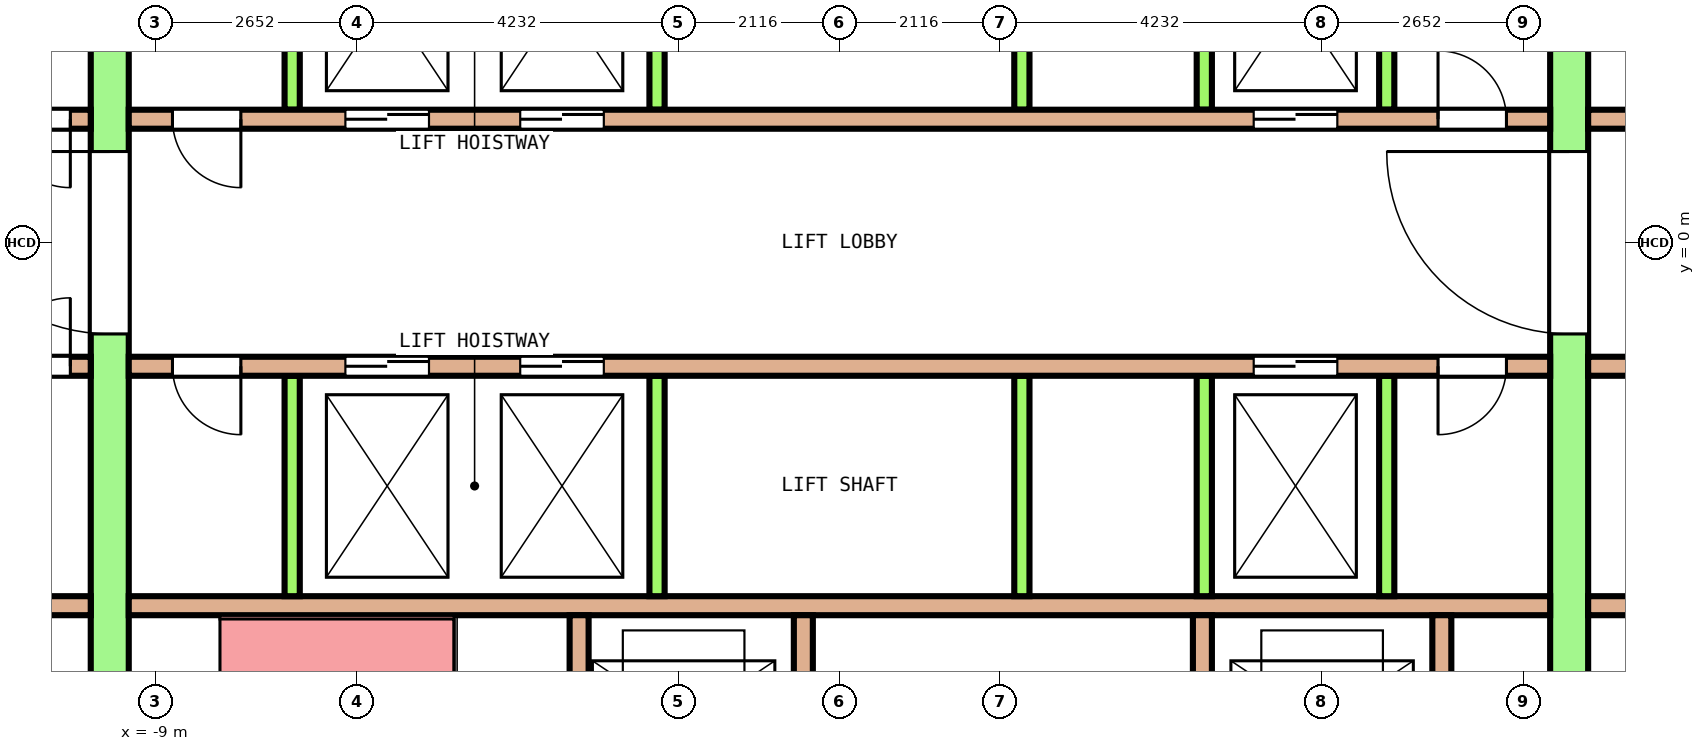
"""IFC4 building model, lengths in metres.
Left out: names, types, materials, properties, quantities, classifications, styles, units other than length and angle.
Written with IfcOpenShell. Run it as: python <this file> out.ifc"""

import sys

from ifc_helpers import new_model, si_unit, direction, frame, frame_2d, origin, place, context, subcontext, project, spatial, rectangle, extrude, element, fill, save


model = new_model("IFC4")
c1 = context("Model", 3, precision=1e-05, world=origin(), true_north=direction((0.0, 1.0)))
c2 = subcontext(c1, "Body", "Model", "MODEL_VIEW")
j1 = project(units=[si_unit("LENGTHUNIT", "METRE"), si_unit("PLANEANGLEUNIT", "RADIAN")], contexts=[c1])
p1 = place(None, origin())
s1 = spatial("IfcSite", under=j1, at=p1, CompositionType="ELEMENT")
p2 = place(p1, origin())
s2 = spatial("IfcBuilding", under=s1, at=p2, CompositionType="ELEMENT")
p3 = place(p2, frame((0.0, 0.0, 149.6)))
s3 = spatial("IfcBuildingStorey", under=s2, at=p3, CompositionType="ELEMENT", Elevation=149.6)
p4 = place(p3, frame((-9.6, -7.75, 0.0), z_axis=(0.0, 0.0, 1.0), x_axis=(0.0, 1.0, 0.0)))
e1 = element("IfcWall", 1, at=p4, inside=s3, PredefinedType="SHEAR", context=c2, shape_type="SweptSolid", body=[
    extrude(rectangle(XDim=15.5, YDim=0.5, at=frame_2d((7.75, 0.0))), origin(), (0.0, 0.0, 1.0), 4.1),
])
p5 = place(p4, frame((6.55, 0.0, 0.0)))
e2 = element("IfcOpeningElement", 2, at=p5, cuts=e1, PredefinedType="OPENING", context=c2, shape_type="SweptSolid", body=[
    extrude(rectangle(XDim=2.4, YDim=2.1, at=frame_2d((1.2, 1.05))), frame((0.0, 0.26, 0.0), z_axis=(0.0, -1.0, 0.0), x_axis=(1.0, 0.0, 0.0)), (0.0, 0.0, 1.0), 0.52),
])
p6 = place(p4, frame((13.45, 0.0, 0.0)))
e3 = element("IfcOpeningElement", 3, at=p6, cuts=e1, PredefinedType="OPENING", context=c2, shape_type="SweptSolid", body=[
    extrude(rectangle(XDim=1.2, YDim=2.1, at=frame_2d((0.6, 1.05))), frame((0.0, 0.26, 0.0), z_axis=(0.0, -1.0, 0.0), x_axis=(1.0, 0.0, 0.0)), (0.0, 0.0, 1.0), 0.52),
])
p7 = place(p4, frame((0.85, 0.0, 0.0)))
e4 = element("IfcOpeningElement", 4, at=p7, cuts=e1, PredefinedType="OPENING", context=c2, shape_type="SweptSolid", body=[
    extrude(rectangle(XDim=1.2, YDim=2.1, at=frame_2d((0.6, 1.05))), frame((0.0, 0.26, 0.0), z_axis=(0.0, -1.0, 0.0), x_axis=(1.0, 0.0, 0.0)), (0.0, 0.0, 1.0), 0.52),
])
p8 = place(p3, frame((9.6, -7.75, 0.0), z_axis=(0.0, 0.0, 1.0), x_axis=(0.0, 1.0, 0.0)))
e5 = element("IfcWall", 5, at=p8, inside=s3, PredefinedType="SHEAR", context=c2, shape_type="SweptSolid", body=[
    extrude(rectangle(XDim=15.5, YDim=0.5, at=frame_2d((7.75, 0.0))), origin(), (0.0, 0.0, 1.0), 4.1),
])
p9 = place(p8, frame((6.55, 0.0, 0.0)))
e6 = element("IfcOpeningElement", 6, at=p9, cuts=e5, PredefinedType="OPENING", context=c2, shape_type="SweptSolid", body=[
    extrude(rectangle(XDim=2.4, YDim=2.1, at=frame_2d((1.2, 1.05))), frame((0.0, 0.26, 0.0), z_axis=(0.0, -1.0, 0.0), x_axis=(1.0, 0.0, 0.0)), (0.0, 0.0, 1.0), 0.52),
])
p10 = place(p8, frame((13.45, 0.0, 0.0)))
e7 = element("IfcOpeningElement", 7, at=p10, cuts=e5, PredefinedType="OPENING", context=c2, shape_type="SweptSolid", body=[
    extrude(rectangle(XDim=1.2, YDim=2.1, at=frame_2d((0.6, 1.05))), frame((0.0, 0.26, 0.0), z_axis=(0.0, -1.0, 0.0), x_axis=(1.0, 0.0, 0.0)), (0.0, 0.0, 1.0), 0.52),
])
p11 = place(p8, frame((0.95, 0.0, 0.0)))
e8 = element("IfcOpeningElement", 8, at=p11, cuts=e5, PredefinedType="OPENING", context=c2, shape_type="SweptSolid", body=[
    extrude(rectangle(XDim=1.0, YDim=2.1, at=frame_2d((0.5, 1.05))), frame((0.0, 0.26, 0.0), z_axis=(0.0, -1.0, 0.0), x_axis=(1.0, 0.0, 0.0)), (0.0, 0.0, 1.0), 0.52),
])
p12 = place(p3, frame((-12.85, 1.625, 0.0), z_axis=(0.0, 0.0, 1.0), x_axis=(1.0, 0.0, 0.0)))
e9 = element("IfcWall", 9, at=p12, inside=s3, PredefinedType="SOLIDWALL", context=c2, shape_type="SweptSolid", body=[
    extrude(rectangle(XDim=3.0, YDim=0.25, at=frame_2d((1.5, 0.0))), origin(), (0.0, 0.0, 1.0), 4.1),
])
p13 = place(p12, frame((0.269, 0.0, 0.0)))
e10 = element("IfcOpeningElement", 10, at=p13, cuts=e9, PredefinedType="OPENING", context=c2, shape_type="SweptSolid", body=[
    extrude(rectangle(XDim=0.9, YDim=2.1, at=frame_2d((0.45, 1.05))), frame((0.0, 0.135, 0.0), z_axis=(0.0, -1.0, 0.0), x_axis=(1.0, 0.0, 0.0)), (0.0, 0.0, 1.0), 0.27),
])
p14 = place(p12, frame((1.831, 0.0, 0.0)))
e11 = element("IfcOpeningElement", 11, at=p14, cuts=e9, PredefinedType="OPENING", context=c2, shape_type="SweptSolid", body=[
    extrude(rectangle(XDim=0.9, YDim=2.1, at=frame_2d((0.45, 1.05))), frame((0.0, 0.135, 0.0), z_axis=(0.0, -1.0, 0.0), x_axis=(1.0, 0.0, 0.0)), (0.0, 0.0, 1.0), 0.27),
])
p15 = place(p3, frame((-9.35, 1.625, 0.0), z_axis=(0.0, 0.0, 1.0), x_axis=(1.0, 0.0, 0.0)))
e12 = element("IfcWall", 12, at=p15, inside=s3, PredefinedType="SOLIDWALL", context=c2, shape_type="SweptSolid", body=[
    extrude(rectangle(XDim=18.7, YDim=0.25, at=frame_2d((9.35, 0.0))), origin(), (0.0, 0.0, 1.0), 4.1),
])
p16 = place(p15, frame((2.85, 0.0, 0.0)))
e13 = element("IfcOpeningElement", 13, at=p16, cuts=e12, PredefinedType="OPENING", context=c2, shape_type="SweptSolid", body=[
    extrude(rectangle(XDim=1.1, YDim=2.1, at=frame_2d((0.55, 1.05))), frame((0.0, 0.135, 0.0), z_axis=(0.0, -1.0, 0.0), x_axis=(1.0, 0.0, 0.0)), (0.0, 0.0, 1.0), 0.27),
])
p17 = place(p15, frame((5.15, 0.0, 0.0)))
e14 = element("IfcOpeningElement", 14, at=p17, cuts=e12, PredefinedType="OPENING", context=c2, shape_type="SweptSolid", body=[
    extrude(rectangle(XDim=1.1, YDim=2.1, at=frame_2d((0.55, 1.05))), frame((0.0, 0.135, 0.0), z_axis=(0.0, -1.0, 0.0), x_axis=(1.0, 0.0, 0.0)), (0.0, 0.0, 1.0), 0.27),
])
p18 = place(p15, frame((14.8, 0.0, 0.0)))
e15 = element("IfcOpeningElement", 15, at=p18, cuts=e12, PredefinedType="OPENING", context=c2, shape_type="SweptSolid", body=[
    extrude(rectangle(XDim=1.1, YDim=2.1, at=frame_2d((0.55, 1.05))), frame((0.0, 0.135, 0.0), z_axis=(0.0, -1.0, 0.0), x_axis=(1.0, 0.0, 0.0)), (0.0, 0.0, 1.0), 0.27),
])
p19 = place(p15, frame((0.575, 0.0, 0.0)))
e16 = element("IfcOpeningElement", 16, at=p19, cuts=e12, PredefinedType="OPENING", context=c2, shape_type="SweptSolid", body=[
    extrude(rectangle(XDim=0.9, YDim=2.1, at=frame_2d((0.45, 1.05))), frame((0.0, 0.135, 0.0), z_axis=(0.0, -1.0, 0.0), x_axis=(1.0, 0.0, 0.0)), (0.0, 0.0, 1.0), 0.27),
])
p20 = place(p15, frame((17.225, 0.0, 0.0)))
e17 = element("IfcOpeningElement", 17, at=p20, cuts=e12, PredefinedType="OPENING", context=c2, shape_type="SweptSolid", body=[
    extrude(rectangle(XDim=0.9, YDim=2.1, at=frame_2d((0.45, 1.05))), frame((0.0, 0.135, 0.0), z_axis=(0.0, -1.0, 0.0), x_axis=(1.0, 0.0, 0.0)), (0.0, 0.0, 1.0), 0.27),
])
p21 = place(p3, frame((9.85, 1.625, 0.0), z_axis=(0.0, 0.0, 1.0), x_axis=(1.0, 0.0, 0.0)))
e18 = element("IfcWall", 18, at=p21, inside=s3, PredefinedType="SOLIDWALL", context=c2, shape_type="SweptSolid", body=[
    extrude(rectangle(XDim=3.0, YDim=0.25, at=frame_2d((1.5, 0.0))), origin(), (0.0, 0.0, 1.0), 4.1),
])
p22 = place(p21, frame((1.05, 0.0, 0.0)))
e19 = element("IfcOpeningElement", 19, at=p22, cuts=e18, PredefinedType="OPENING", context=c2, shape_type="SweptSolid", body=[
    extrude(rectangle(XDim=0.9, YDim=2.1, at=frame_2d((0.45, 1.05))), frame((0.0, 0.135, 0.0), z_axis=(0.0, -1.0, 0.0), x_axis=(1.0, 0.0, 0.0)), (0.0, 0.0, 1.0), 0.27),
])
for number, where, z_axis, x_axis in (
    (20, (-7.2, 1.75, 0.0), (0.0, 0.0, 1.0), (0.0, 1.0, 0.0)),
    (21, (-2.4, 1.75, 0.0), (0.0, 0.0, 1.0), (0.0, 1.0, 0.0)),
    (22, (2.4, 1.75, 0.0), (0.0, 0.0, 1.0), (0.0, 1.0, 0.0)),
    (23, (4.8, 1.75, 0.0), (0.0, 0.0, 1.0), (0.0, 1.0, 0.0)),
    (24, (7.2, 1.75, 0.0), (0.0, 0.0, 1.0), (0.0, 1.0, 0.0)),
):
    element("IfcWall", number, at=place(p3, frame(where, z_axis=z_axis, x_axis=x_axis)), inside=s3, PredefinedType="SOLIDWALL", context=c2, shape_type="SweptSolid", body=[
        extrude(rectangle(XDim=2.9, YDim=0.2, at=frame_2d((1.45, 0.0))), origin(), (0.0, 0.0, 1.0), 4.1),
    ])
p23 = place(p3, frame((-12.85, -1.625, 0.0), z_axis=(0.0, 0.0, 1.0), x_axis=(1.0, 0.0, 0.0)))
e25 = element("IfcWall", 25, at=p23, inside=s3, PredefinedType="SOLIDWALL", context=c2, shape_type="SweptSolid", body=[
    extrude(rectangle(XDim=3.0, YDim=0.25, at=frame_2d((1.5, 0.0))), origin(), (0.0, 0.0, 1.0), 4.1),
])
p24 = place(p23, frame((0.269, 0.0, 0.0)))
e26 = element("IfcOpeningElement", 26, at=p24, cuts=e25, PredefinedType="OPENING", context=c2, shape_type="SweptSolid", body=[
    extrude(rectangle(XDim=0.9, YDim=2.1, at=frame_2d((0.45, 1.05))), frame((0.0, 0.135, 0.0), z_axis=(0.0, -1.0, 0.0), x_axis=(1.0, 0.0, 0.0)), (0.0, 0.0, 1.0), 0.27),
])
p25 = place(p23, frame((1.831, 0.0, 0.0)))
e27 = element("IfcOpeningElement", 27, at=p25, cuts=e25, PredefinedType="OPENING", context=c2, shape_type="SweptSolid", body=[
    extrude(rectangle(XDim=0.9, YDim=2.1, at=frame_2d((0.45, 1.05))), frame((0.0, 0.135, 0.0), z_axis=(0.0, -1.0, 0.0), x_axis=(1.0, 0.0, 0.0)), (0.0, 0.0, 1.0), 0.27),
])
p26 = place(p3, frame((-9.35, -1.625, 0.0), z_axis=(0.0, 0.0, 1.0), x_axis=(1.0, 0.0, 0.0)))
e28 = element("IfcWall", 28, at=p26, inside=s3, PredefinedType="SOLIDWALL", context=c2, shape_type="SweptSolid", body=[
    extrude(rectangle(XDim=18.7, YDim=0.25, at=frame_2d((9.35, 0.0))), origin(), (0.0, 0.0, 1.0), 4.1),
])
p27 = place(p26, frame((2.85, 0.0, 0.0)))
e29 = element("IfcOpeningElement", 29, at=p27, cuts=e28, PredefinedType="OPENING", context=c2, shape_type="SweptSolid", body=[
    extrude(rectangle(XDim=1.1, YDim=2.1, at=frame_2d((0.55, 1.05))), frame((0.0, 0.135, 0.0), z_axis=(0.0, -1.0, 0.0), x_axis=(1.0, 0.0, 0.0)), (0.0, 0.0, 1.0), 0.27),
])
p28 = place(p26, frame((5.15, 0.0, 0.0)))
e30 = element("IfcOpeningElement", 30, at=p28, cuts=e28, PredefinedType="OPENING", context=c2, shape_type="SweptSolid", body=[
    extrude(rectangle(XDim=1.1, YDim=2.1, at=frame_2d((0.55, 1.05))), frame((0.0, 0.135, 0.0), z_axis=(0.0, -1.0, 0.0), x_axis=(1.0, 0.0, 0.0)), (0.0, 0.0, 1.0), 0.27),
])
p29 = place(p26, frame((14.8, 0.0, 0.0)))
e31 = element("IfcOpeningElement", 31, at=p29, cuts=e28, PredefinedType="OPENING", context=c2, shape_type="SweptSolid", body=[
    extrude(rectangle(XDim=1.1, YDim=2.1, at=frame_2d((0.55, 1.05))), frame((0.0, 0.135, 0.0), z_axis=(0.0, -1.0, 0.0), x_axis=(1.0, 0.0, 0.0)), (0.0, 0.0, 1.0), 0.27),
])
p30 = place(p26, frame((0.575, 0.0, 0.0)))
e32 = element("IfcOpeningElement", 32, at=p30, cuts=e28, PredefinedType="OPENING", context=c2, shape_type="SweptSolid", body=[
    extrude(rectangle(XDim=0.9, YDim=2.1, at=frame_2d((0.45, 1.05))), frame((0.0, 0.135, 0.0), z_axis=(0.0, -1.0, 0.0), x_axis=(1.0, 0.0, 0.0)), (0.0, 0.0, 1.0), 0.27),
])
p31 = place(p26, frame((17.225, 0.0, 0.0)))
e33 = element("IfcOpeningElement", 33, at=p31, cuts=e28, PredefinedType="OPENING", context=c2, shape_type="SweptSolid", body=[
    extrude(rectangle(XDim=0.9, YDim=2.1, at=frame_2d((0.45, 1.05))), frame((0.0, 0.135, 0.0), z_axis=(0.0, -1.0, 0.0), x_axis=(1.0, 0.0, 0.0)), (0.0, 0.0, 1.0), 0.27),
])
p32 = place(p3, frame((9.85, -1.625, 0.0), z_axis=(0.0, 0.0, 1.0), x_axis=(1.0, 0.0, 0.0)))
e34 = element("IfcWall", 34, at=p32, inside=s3, PredefinedType="SOLIDWALL", context=c2, shape_type="SweptSolid", body=[
    extrude(rectangle(XDim=3.0, YDim=0.25, at=frame_2d((1.5, 0.0))), origin(), (0.0, 0.0, 1.0), 4.1),
])
p33 = place(p32, frame((1.05, 0.0, 0.0)))
e35 = element("IfcOpeningElement", 35, at=p33, cuts=e34, PredefinedType="OPENING", context=c2, shape_type="SweptSolid", body=[
    extrude(rectangle(XDim=0.9, YDim=2.1, at=frame_2d((0.45, 1.05))), frame((0.0, 0.135, 0.0), z_axis=(0.0, -1.0, 0.0), x_axis=(1.0, 0.0, 0.0)), (0.0, 0.0, 1.0), 0.27),
])
p34 = place(p3, frame((-12.85, -4.775, 0.0), z_axis=(0.0, 0.0, 1.0), x_axis=(1.0, 0.0, 0.0)))
e36 = element("IfcWall", 36, at=p34, inside=s3, PredefinedType="SOLIDWALL", context=c2, shape_type="SweptSolid", body=[
    extrude(rectangle(XDim=3.0, YDim=0.25, at=frame_2d((1.5, 0.0))), origin(), (0.0, 0.0, 1.0), 4.1),
])
p35 = place(p3, frame((-9.35, -4.775, 0.0), z_axis=(0.0, 0.0, 1.0), x_axis=(1.0, 0.0, 0.0)))
e37 = element("IfcWall", 37, at=p35, inside=s3, PredefinedType="SOLIDWALL", context=c2, shape_type="SweptSolid", body=[
    extrude(rectangle(XDim=18.7, YDim=0.25, at=frame_2d((9.35, 0.0))), origin(), (0.0, 0.0, 1.0), 4.1),
])
p36 = place(p3, frame((9.85, -4.775, 0.0), z_axis=(0.0, 0.0, 1.0), x_axis=(1.0, 0.0, 0.0)))
e38 = element("IfcWall", 38, at=p36, inside=s3, PredefinedType="SOLIDWALL", context=c2, shape_type="SweptSolid", body=[
    extrude(rectangle(XDim=3.0, YDim=0.25, at=frame_2d((1.5, 0.0))), origin(), (0.0, 0.0, 1.0), 4.1),
])
for number, where, z_axis, x_axis in (
    (39, (-7.2, -4.65, 0.0), (0.0, 0.0, 1.0), (0.0, 1.0, 0.0)),
    (40, (-2.4, -4.65, 0.0), (0.0, 0.0, 1.0), (0.0, 1.0, 0.0)),
    (41, (2.4, -4.65, 0.0), (0.0, 0.0, 1.0), (0.0, 1.0, 0.0)),
    (42, (4.8, -4.65, 0.0), (0.0, 0.0, 1.0), (0.0, 1.0, 0.0)),
    (43, (7.2, -4.65, 0.0), (0.0, 0.0, 1.0), (0.0, 1.0, 0.0)),
):
    element("IfcWall", number, at=place(p3, frame(where, z_axis=z_axis, x_axis=x_axis)), inside=s3, PredefinedType="SOLIDWALL", context=c2, shape_type="SweptSolid", body=[
        extrude(rectangle(XDim=2.9, YDim=0.2, at=frame_2d((1.45, 0.0))), origin(), (0.0, 0.0, 1.0), 4.1),
    ])
p37 = place(p3, frame((-3.425, -7.75, 0.0), z_axis=(0.0, 0.0, 1.0), x_axis=(0.0, 1.0, 0.0)))
e44 = element("IfcWall", 44, at=p37, inside=s3, PredefinedType="SOLIDWALL", context=c2, shape_type="SweptSolid", body=[
    extrude(rectangle(XDim=2.85, YDim=0.25, at=frame_2d((1.425, 0.0))), origin(), (0.0, 0.0, 1.0), 4.1),
])
p38 = place(p3, frame((-0.475, -7.75, 0.0), z_axis=(0.0, 0.0, 1.0), x_axis=(0.0, 1.0, 0.0)))
e45 = element("IfcWall", 45, at=p38, inside=s3, PredefinedType="SOLIDWALL", context=c2, shape_type="SweptSolid", body=[
    extrude(rectangle(XDim=2.85, YDim=0.25, at=frame_2d((1.425, 0.0))), origin(), (0.0, 0.0, 1.0), 4.1),
])
p39 = place(p38, frame((0.875, 0.0, 0.0)))
e46 = element("IfcOpeningElement", 46, at=p39, cuts=e45, PredefinedType="OPENING", context=c2, shape_type="SweptSolid", body=[
    extrude(rectangle(XDim=1.1, YDim=2.1, at=frame_2d((0.55, 1.05))), frame((0.0, 0.135, 0.0), z_axis=(0.0, -1.0, 0.0), x_axis=(1.0, 0.0, 0.0)), (0.0, 0.0, 1.0), 0.27),
])
p40 = place(p3, frame((4.775, -7.75, 0.0), z_axis=(0.0, 0.0, 1.0), x_axis=(0.0, 1.0, 0.0)))
e47 = element("IfcWall", 47, at=p40, inside=s3, PredefinedType="SOLIDWALL", context=c2, shape_type="SweptSolid", body=[
    extrude(rectangle(XDim=2.85, YDim=0.25, at=frame_2d((1.425, 0.0))), origin(), (0.0, 0.0, 1.0), 4.1),
])
p41 = place(p40, frame((0.875, 0.0, 0.0)))
e48 = element("IfcOpeningElement", 48, at=p41, cuts=e47, PredefinedType="OPENING", context=c2, shape_type="SweptSolid", body=[
    extrude(rectangle(XDim=1.1, YDim=2.1, at=frame_2d((0.55, 1.05))), frame((0.0, 0.135, 0.0), z_axis=(0.0, -1.0, 0.0), x_axis=(1.0, 0.0, 0.0)), (0.0, 0.0, 1.0), 0.27),
])
p42 = place(p3, frame((7.925, -7.75, 0.0), z_axis=(0.0, 0.0, 1.0), x_axis=(0.0, 1.0, 0.0)))
e49 = element("IfcWall", 49, at=p42, inside=s3, PredefinedType="SOLIDWALL", context=c2, shape_type="SweptSolid", body=[
    extrude(rectangle(XDim=2.85, YDim=0.25, at=frame_2d((1.425, 0.0))), origin(), (0.0, 0.0, 1.0), 4.1),
])
p43 = place(p16, origin())
e50 = element("IfcDoor", 50, at=p43, inside=s3, OperationType="DOUBLE_DOOR_SLIDING", PredefinedType="DOOR", context=c2, shape_type="SweptSolid", body=[
    extrude(rectangle(XDim=1.1, YDim=2.1, at=frame_2d((0.55, 1.05))), frame((0.0, 0.075, 0.0), z_axis=(0.0, -1.0, 0.0), x_axis=(1.0, 0.0, 0.0)), (0.0, 0.0, 1.0), 0.15),
])
fill(e13, e50)
p44 = place(p17, origin())
e51 = element("IfcDoor", 51, at=p44, inside=s3, OperationType="DOUBLE_DOOR_SLIDING", PredefinedType="DOOR", context=c2, shape_type="SweptSolid", body=[
    extrude(rectangle(XDim=1.1, YDim=2.1, at=frame_2d((0.55, 1.05))), frame((0.0, 0.075, 0.0), z_axis=(0.0, -1.0, 0.0), x_axis=(1.0, 0.0, 0.0)), (0.0, 0.0, 1.0), 0.15),
])
fill(e14, e51)
p45 = place(p18, origin())
e52 = element("IfcDoor", 52, at=p45, inside=s3, OperationType="DOUBLE_DOOR_SLIDING", PredefinedType="DOOR", context=c2, shape_type="SweptSolid", body=[
    extrude(rectangle(XDim=1.1, YDim=2.1, at=frame_2d((0.55, 1.05))), frame((0.0, 0.075, 0.0), z_axis=(0.0, -1.0, 0.0), x_axis=(1.0, 0.0, 0.0)), (0.0, 0.0, 1.0), 0.15),
])
fill(e15, e52)
p46 = place(p27, origin())
e53 = element("IfcDoor", 53, at=p46, inside=s3, OperationType="DOUBLE_DOOR_SLIDING", PredefinedType="DOOR", context=c2, shape_type="SweptSolid", body=[
    extrude(rectangle(XDim=1.1, YDim=2.1, at=frame_2d((0.55, 1.05))), frame((0.0, 0.075, 0.0), z_axis=(0.0, -1.0, 0.0), x_axis=(1.0, 0.0, 0.0)), (0.0, 0.0, 1.0), 0.15),
])
fill(e29, e53)
p47 = place(p28, origin())
e54 = element("IfcDoor", 54, at=p47, inside=s3, OperationType="DOUBLE_DOOR_SLIDING", PredefinedType="DOOR", context=c2, shape_type="SweptSolid", body=[
    extrude(rectangle(XDim=1.1, YDim=2.1, at=frame_2d((0.55, 1.05))), frame((0.0, 0.075, 0.0), z_axis=(0.0, -1.0, 0.0), x_axis=(1.0, 0.0, 0.0)), (0.0, 0.0, 1.0), 0.15),
])
fill(e30, e54)
p48 = place(p29, origin())
e55 = element("IfcDoor", 55, at=p48, inside=s3, OperationType="DOUBLE_DOOR_SLIDING", PredefinedType="DOOR", context=c2, shape_type="SweptSolid", body=[
    extrude(rectangle(XDim=1.1, YDim=2.1, at=frame_2d((0.55, 1.05))), frame((0.0, 0.075, 0.0), z_axis=(0.0, -1.0, 0.0), x_axis=(1.0, 0.0, 0.0)), (0.0, 0.0, 1.0), 0.15),
])
fill(e31, e55)
p49 = place(p5, origin())
e56 = element("IfcDoor", 56, at=p49, inside=s3, OperationType="DOUBLE_DOOR_SINGLE_SWING", PredefinedType="DOOR", context=c2, shape_type="SweptSolid", body=[
    extrude(rectangle(XDim=2.4, YDim=2.1, at=frame_2d((1.2, 1.05))), frame((0.0, 0.2, 0.0), z_axis=(0.0, -1.0, 0.0), x_axis=(1.0, 0.0, 0.0)), (0.0, 0.0, 1.0), 0.4),
])
fill(e2, e56)
p50 = place(p9, origin())
e57 = element("IfcDoor", 57, at=p50, inside=s3, OperationType="DOUBLE_DOOR_SINGLE_SWING", PredefinedType="DOOR", context=c2, shape_type="SweptSolid", body=[
    extrude(rectangle(XDim=2.4, YDim=2.1, at=frame_2d((1.2, 1.05))), frame((0.0, 0.2, 0.0), z_axis=(0.0, -1.0, 0.0), x_axis=(1.0, 0.0, 0.0)), (0.0, 0.0, 1.0), 0.4),
])
fill(e6, e57)
p51 = place(p14, origin())
e58 = element("IfcDoor", 58, at=p51, inside=s3, OperationType="SINGLE_SWING_LEFT", PredefinedType="DOOR", context=c2, shape_type="SweptSolid", body=[
    extrude(rectangle(XDim=0.9, YDim=2.1, at=frame_2d((0.45, 1.05))), frame((0.0, 0.075, 0.0), z_axis=(0.0, -1.0, 0.0), x_axis=(1.0, 0.0, 0.0)), (0.0, 0.0, 1.0), 0.15),
])
fill(e11, e58)
p52 = place(p19, origin())
e59 = element("IfcDoor", 59, at=p52, inside=s3, OperationType="SINGLE_SWING_RIGHT", PredefinedType="DOOR", context=c2, shape_type="SweptSolid", body=[
    extrude(rectangle(XDim=0.9, YDim=2.1, at=frame_2d((0.45, 1.05))), frame((0.0, 0.075, 0.0), z_axis=(0.0, -1.0, 0.0), x_axis=(1.0, 0.0, 0.0)), (0.0, 0.0, 1.0), 0.15),
])
fill(e16, e59)
p53 = place(p20, origin())
e60 = element("IfcDoor", 60, at=p53, inside=s3, OperationType="SINGLE_SWING_LEFT", PredefinedType="DOOR", context=c2, shape_type="SweptSolid", body=[
    extrude(rectangle(XDim=0.9, YDim=2.1, at=frame_2d((0.45, 1.05))), frame((0.0, 0.075, 0.0), z_axis=(0.0, -1.0, 0.0), x_axis=(1.0, 0.0, 0.0)), (0.0, 0.0, 1.0), 0.15),
])
fill(e17, e60)
p54 = place(p25, origin())
e61 = element("IfcDoor", 61, at=p54, inside=s3, OperationType="SINGLE_SWING_RIGHT", PredefinedType="DOOR", context=c2, shape_type="SweptSolid", body=[
    extrude(rectangle(XDim=0.9, YDim=2.1, at=frame_2d((0.45, 1.05))), frame((0.0, 0.075, 0.0), z_axis=(0.0, -1.0, 0.0), x_axis=(1.0, 0.0, 0.0)), (0.0, 0.0, 1.0), 0.15),
])
fill(e27, e61)
p55 = place(p30, origin())
e62 = element("IfcDoor", 62, at=p55, inside=s3, OperationType="SINGLE_SWING_LEFT", PredefinedType="DOOR", context=c2, shape_type="SweptSolid", body=[
    extrude(rectangle(XDim=0.9, YDim=2.1, at=frame_2d((0.45, 1.05))), frame((0.0, 0.075, 0.0), z_axis=(0.0, -1.0, 0.0), x_axis=(1.0, 0.0, 0.0)), (0.0, 0.0, 1.0), 0.15),
])
fill(e32, e62)
p56 = place(p31, origin())
e63 = element("IfcDoor", 63, at=p56, inside=s3, OperationType="SINGLE_SWING_RIGHT", PredefinedType="DOOR", context=c2, shape_type="SweptSolid", body=[
    extrude(rectangle(XDim=0.9, YDim=2.1, at=frame_2d((0.45, 1.05))), frame((0.0, 0.075, 0.0), z_axis=(0.0, -1.0, 0.0), x_axis=(1.0, 0.0, 0.0)), (0.0, 0.0, 1.0), 0.15),
])
fill(e33, e63)
save(model, sys.argv[1])
